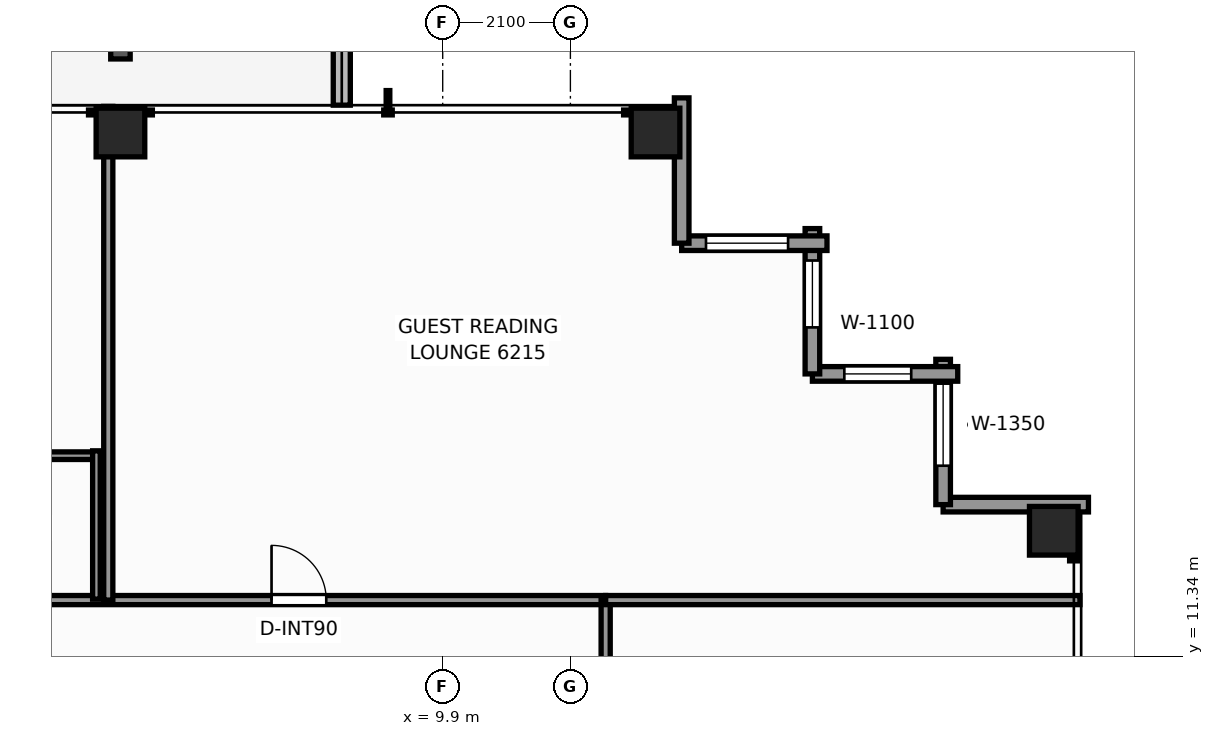
"""IFC4 building model, lengths in metres.
Left out: names, types, materials, properties, quantities, classifications, styles, units other than length and angle.
Written with IfcOpenShell. Run it as: python <this file> out.ifc"""

import sys

from ifc_helpers import new_model, si_unit, direction, frame, frame_2d, origin, origin_2d, place, context, subcontext, project, spatial, rectangle, extrude, element, fill, save


model = new_model("IFC4")
c1 = context("Model", 3, precision=1e-05, world=origin(), true_north=direction((0.0, 1.0)))
c2 = subcontext(c1, "Body", "Model", "MODEL_VIEW")
j1 = project(units=[si_unit("LENGTHUNIT", "METRE"), si_unit("PLANEANGLEUNIT", "RADIAN")], contexts=[c1])
p1 = place(None, origin())
s1 = spatial("IfcSite", under=j1, at=p1, CompositionType="ELEMENT")
p2 = place(p1, origin())
s2 = spatial("IfcBuilding", under=s1, at=p2, CompositionType="ELEMENT")
p3 = place(p2, frame((0.0, 0.0, 213.0)))
s3 = spatial("IfcBuildingStorey", under=s2, at=p3, CompositionType="ELEMENT", Elevation=213.0)
for number, where, z_axis, x_axis in (
    (1, (4.6, 19.95, 0.0), (0.0, 0.0, 1.0), (1.0, 0.0, 0.0)),
    (2, (13.4, 19.95, 0.0), (0.0, 0.0, 1.0), (1.0, 0.0, 0.0)),
    (3, (19.95, 13.4, 0.0), (0.0, 0.0, 1.0), (1.0, 0.0, 0.0)),
):
    element("IfcColumn", number, at=place(p3, frame(where, z_axis=z_axis, x_axis=x_axis)), inside=s3, PredefinedType="COLUMN", context=c2, shape_type="SweptSolid", body=[
        extrude(rectangle(XDim=0.8, YDim=0.8, at=origin_2d()), origin(), (0.0, 0.0, 1.0), 3.3),
    ])
p4 = place(p3, frame((8.24, 20.4, -0.04), z_axis=(0.0, 0.0, 1.0), x_axis=(0.0, 1.0, 0.0)))
e4 = element("IfcWall", 4, at=p4, inside=s3, PredefinedType="PARAPET", context=c2, shape_type="SweptSolid", body=[
    extrude(rectangle(XDim=3.42, YDim=0.28, at=frame_2d((1.71, 0.0))), origin(), (0.0, 0.0, 1.0), 0.42),
])
p5 = place(p3, frame((18.13, 13.83, 0.0), z_axis=(0.0, 0.0, 1.0), x_axis=(1.0, 0.0, 0.0)))
e5 = element("IfcWall", 5, at=p5, inside=s3, PredefinedType="STANDARD", context=c2, shape_type="SweptSolid", body=[
    extrude(rectangle(XDim=2.39, YDim=0.24, at=frame_2d((1.195, 0.0))), origin(), (0.0, 0.0, 1.0), 2.463),
])
p6 = place(p3, frame((18.13, 16.22, 0.0), z_axis=(0.0, 0.0, 1.0), x_axis=(0.0, -1.0, 0.0)))
e6 = element("IfcWall", 6, at=p6, inside=s3, PredefinedType="STANDARD", context=c2, shape_type="SweptSolid", body=[
    extrude(rectangle(XDim=2.39, YDim=0.24, at=frame_2d((1.195, 0.0))), origin(), (0.0, 0.0, 1.0), 2.463),
])
p7 = place(p6, frame((0.4, 0.0, 0.65)))
e7 = element("IfcOpeningElement", 7, at=p7, cuts=e6, PredefinedType="OPENING", context=c2, shape_type="SweptSolid", body=[
    extrude(rectangle(XDim=1.35, YDim=1.55, at=frame_2d((0.675, 0.775))), frame((0.0, 0.13, 0.0), z_axis=(0.0, -1.0, 0.0), x_axis=(1.0, 0.0, 0.0)), (0.0, 0.0, 1.0), 0.26),
])
p8 = place(p3, frame((15.98, 15.98, 0.0), z_axis=(0.0, 0.0, 1.0), x_axis=(1.0, 0.0, 0.0)))
e8 = element("IfcWall", 8, at=p8, inside=s3, PredefinedType="STANDARD", context=c2, shape_type="SweptSolid", body=[
    extrude(rectangle(XDim=2.39, YDim=0.24, at=frame_2d((1.195, 0.0))), origin(), (0.0, 0.0, 1.0), 2.463),
])
p9 = place(p8, frame((0.525, 0.0, 0.65)))
e9 = element("IfcOpeningElement", 9, at=p9, cuts=e8, PredefinedType="OPENING", context=c2, shape_type="SweptSolid", body=[
    extrude(rectangle(XDim=1.1, YDim=1.45, at=frame_2d((0.55, 0.725))), frame((0.0, 0.13, 0.0), z_axis=(0.0, -1.0, 0.0), x_axis=(1.0, 0.0, 0.0)), (0.0, 0.0, 1.0), 0.26),
])
p10 = place(p3, frame((15.98, 18.37, 0.0), z_axis=(0.0, 0.0, 1.0), x_axis=(0.0, -1.0, 0.0)))
e10 = element("IfcWall", 10, at=p10, inside=s3, PredefinedType="STANDARD", context=c2, shape_type="SweptSolid", body=[
    extrude(rectangle(XDim=2.39, YDim=0.24, at=frame_2d((1.195, 0.0))), origin(), (0.0, 0.0, 1.0), 2.463),
])
p11 = place(p10, frame((0.525, 0.0, 0.65)))
e11 = element("IfcOpeningElement", 11, at=p11, cuts=e10, PredefinedType="OPENING", context=c2, shape_type="SweptSolid", body=[
    extrude(rectangle(XDim=1.1, YDim=1.45, at=frame_2d((0.55, 0.725))), frame((0.0, 0.13, 0.0), z_axis=(0.0, -1.0, 0.0), x_axis=(1.0, 0.0, 0.0)), (0.0, 0.0, 1.0), 0.26),
])
p12 = place(p3, frame((13.83, 18.13, 0.0), z_axis=(0.0, 0.0, 1.0), x_axis=(1.0, 0.0, 0.0)))
e12 = element("IfcWall", 12, at=p12, inside=s3, PredefinedType="STANDARD", context=c2, shape_type="SweptSolid", body=[
    extrude(rectangle(XDim=2.39, YDim=0.24, at=frame_2d((1.195, 0.0))), origin(), (0.0, 0.0, 1.0), 2.463),
])
p13 = place(p12, frame((0.4, 0.0, 0.65)))
e13 = element("IfcOpeningElement", 13, at=p13, cuts=e12, PredefinedType="OPENING", context=c2, shape_type="SweptSolid", body=[
    extrude(rectangle(XDim=1.35, YDim=1.55, at=frame_2d((0.675, 0.775))), frame((0.0, 0.13, 0.0), z_axis=(0.0, -1.0, 0.0), x_axis=(1.0, 0.0, 0.0)), (0.0, 0.0, 1.0), 0.26),
])
p14 = place(p3, frame((13.83, 20.52, 0.0), z_axis=(0.0, 0.0, 1.0), x_axis=(0.0, -1.0, 0.0)))
e14 = element("IfcWall", 14, at=p14, inside=s3, PredefinedType="STANDARD", context=c2, shape_type="SweptSolid", body=[
    extrude(rectangle(XDim=2.39, YDim=0.24, at=frame_2d((1.195, 0.0))), origin(), (0.0, 0.0, 1.0), 2.463),
])
p15 = place(p3, frame((-12.58, 12.26, 0.0), z_axis=(0.0, 0.0, 1.0), x_axis=(1.0, 0.0, 0.0)))
e15 = element("IfcWall", 15, at=p15, inside=s3, PredefinedType="PARTITIONING", context=c2, shape_type="SweptSolid", body=[
    extrude(rectangle(XDim=25.16, YDim=0.15, at=frame_2d((12.58, 0.0))), origin(), (0.0, 0.0, 1.0), 2.369),
])
p16 = place(p15, frame((3.133, 0.0, 0.0)))
e16 = element("IfcOpeningElement", 16, at=p16, cuts=e15, PredefinedType="OPENING", context=c2, shape_type="SweptSolid", body=[
    extrude(rectangle(XDim=0.9, YDim=2.06, at=frame_2d((0.45, 1.03))), frame((0.0, 0.085, 0.0), z_axis=(0.0, -1.0, 0.0), x_axis=(1.0, 0.0, 0.0)), (0.0, 0.0, 1.0), 0.17),
])
p17 = place(p15, frame((9.188, 0.0, 0.0)))
e17 = element("IfcOpeningElement", 17, at=p17, cuts=e15, PredefinedType="OPENING", context=c2, shape_type="SweptSolid", body=[
    extrude(rectangle(XDim=0.95, YDim=2.06, at=frame_2d((0.475, 1.03))), frame((0.0, 0.085, 0.0), z_axis=(0.0, -1.0, 0.0), x_axis=(1.0, 0.0, 0.0)), (0.0, 0.0, 1.0), 0.17),
])
p18 = place(p15, frame((13.087, 0.0, 0.0)))
e18 = element("IfcOpeningElement", 18, at=p18, cuts=e15, PredefinedType="OPENING", context=c2, shape_type="SweptSolid", body=[
    extrude(rectangle(XDim=0.95, YDim=2.06, at=frame_2d((0.475, 1.03))), frame((0.0, 0.085, 0.0), z_axis=(0.0, -1.0, 0.0), x_axis=(1.0, 0.0, 0.0)), (0.0, 0.0, 1.0), 0.17),
])
p19 = place(p15, frame((19.665, 0.0, 0.0)))
e19 = element("IfcOpeningElement", 19, at=p19, cuts=e15, PredefinedType="OPENING", context=c2, shape_type="SweptSolid", body=[
    extrude(rectangle(XDim=0.9, YDim=2.06, at=frame_2d((0.45, 1.03))), frame((0.0, 0.085, 0.0), z_axis=(0.0, -1.0, 0.0), x_axis=(1.0, 0.0, 0.0)), (0.0, 0.0, 1.0), 0.17),
])
p20 = place(p3, frame((12.58, -12.58, 0.0), z_axis=(0.0, 0.0, 1.0), x_axis=(0.0, 1.0, 0.0)))
e20 = element("IfcWall", 20, at=p20, inside=s3, PredefinedType="PARTITIONING", context=c2, shape_type="SweptSolid", body=[
    extrude(rectangle(XDim=24.84, YDim=0.15, at=frame_2d((12.42, 0.0))), origin(), (0.0, 0.0, 1.0), 2.369),
])
p21 = place(p20, frame((3.338, 0.0, 0.0)))
e21 = element("IfcOpeningElement", 21, at=p21, cuts=e20, PredefinedType="OPENING", context=c2, shape_type="SweptSolid", body=[
    extrude(rectangle(XDim=0.95, YDim=2.06, at=frame_2d((0.475, 1.03))), frame((0.0, 0.085, 0.0), z_axis=(0.0, -1.0, 0.0), x_axis=(1.0, 0.0, 0.0)), (0.0, 0.0, 1.0), 0.17),
])
p22 = place(p20, frame((9.119, 0.0, 0.0)))
e22 = element("IfcOpeningElement", 22, at=p22, cuts=e20, PredefinedType="OPENING", context=c2, shape_type="SweptSolid", body=[
    extrude(rectangle(XDim=0.95, YDim=2.06, at=frame_2d((0.475, 1.03))), frame((0.0, 0.085, 0.0), z_axis=(0.0, -1.0, 0.0), x_axis=(1.0, 0.0, 0.0)), (0.0, 0.0, 1.0), 0.17),
])
p23 = place(p20, frame((14.452, 0.0, 0.0)))
e23 = element("IfcOpeningElement", 23, at=p23, cuts=e20, PredefinedType="OPENING", context=c2, shape_type="SweptSolid", body=[
    extrude(rectangle(XDim=0.95, YDim=2.06, at=frame_2d((0.475, 1.03))), frame((0.0, 0.085, 0.0), z_axis=(0.0, -1.0, 0.0), x_axis=(1.0, 0.0, 0.0)), (0.0, 0.0, 1.0), 0.17),
])
p24 = place(p20, frame((20.887, 0.0, 0.0)))
e24 = element("IfcOpeningElement", 24, at=p24, cuts=e20, PredefinedType="OPENING", context=c2, shape_type="SweptSolid", body=[
    extrude(rectangle(XDim=0.95, YDim=2.06, at=frame_2d((0.475, 1.03))), frame((0.0, 0.085, 0.0), z_axis=(0.0, -1.0, 0.0), x_axis=(1.0, 0.0, 0.0)), (0.0, 0.0, 1.0), 0.17),
])
p25 = place(p3, frame((12.58, 12.26, 0.0), z_axis=(0.0, 0.0, 1.0), x_axis=(1.0, 0.0, 0.0)))
e25 = element("IfcWall", 25, at=p25, inside=s3, PredefinedType="PARTITIONING", context=c2, shape_type="SweptSolid", body=[
    extrude(rectangle(XDim=7.8, YDim=0.15, at=frame_2d((3.9, 0.0))), origin(), (0.0, 0.0, 1.0), 2.369),
])
p26 = place(p3, frame((4.4, 12.26, 0.0), z_axis=(0.0, 0.0, 1.0), x_axis=(0.0, 1.0, 0.0)))
e26 = element("IfcWall", 26, at=p26, inside=s3, PredefinedType="PARTITIONING", context=c2, shape_type="SweptSolid", body=[
    extrude(rectangle(XDim=8.12, YDim=0.15, at=frame_2d((4.06, 0.0))), origin(), (0.0, 0.0, 1.0), 2.369),
])
p27 = place(p3, frame((1.995, 14.635, 0.0), z_axis=(0.0, 0.0, 1.0), x_axis=(1.0, 0.0, 0.0)))
e27 = element("IfcWall", 27, at=p27, inside=s3, PredefinedType="PARTITIONING", context=c2, shape_type="SweptSolid", body=[
    extrude(rectangle(XDim=2.27, YDim=0.125, at=frame_2d((1.135, 0.0))), origin(), (0.0, 0.0, 1.0), 3.08),
])
p28 = place(p3, frame((4.205, 12.275, 0.0), z_axis=(0.0, 0.0, 1.0), x_axis=(0.0, 1.0, 0.0)))
e28 = element("IfcWall", 28, at=p28, inside=s3, PredefinedType="PARTITIONING", context=c2, shape_type="SweptSolid", body=[
    extrude(rectangle(XDim=2.44, YDim=0.125, at=frame_2d((1.22, 0.0))), origin(), (0.0, 0.0, 1.0), 3.08),
])
p29 = place(p7, origin())
e29 = element("IfcWindow", 29, at=p29, inside=s3, PartitioningType="SINGLE_PANEL", PredefinedType="WINDOW", context=c2, shape_type="SweptSolid", body=[
    extrude(rectangle(XDim=1.35, YDim=1.55, at=frame_2d((0.675, 0.775))), frame((0.0, 0.03, 0.0), z_axis=(0.0, -1.0, 0.0), x_axis=(1.0, 0.0, 0.0)), (0.0, 0.0, 1.0), 0.06),
])
fill(e7, e29)
p30 = place(p9, origin())
e30 = element("IfcWindow", 30, at=p30, inside=s3, PartitioningType="SINGLE_PANEL", PredefinedType="WINDOW", context=c2, shape_type="SweptSolid", body=[
    extrude(rectangle(XDim=1.1, YDim=1.45, at=frame_2d((0.55, 0.725))), frame((0.0, 0.03, 0.0), z_axis=(0.0, -1.0, 0.0), x_axis=(1.0, 0.0, 0.0)), (0.0, 0.0, 1.0), 0.06),
])
fill(e9, e30)
p31 = place(p11, origin())
e31 = element("IfcWindow", 31, at=p31, inside=s3, PartitioningType="SINGLE_PANEL", PredefinedType="WINDOW", context=c2, shape_type="SweptSolid", body=[
    extrude(rectangle(XDim=1.1, YDim=1.45, at=frame_2d((0.55, 0.725))), frame((0.0, 0.03, 0.0), z_axis=(0.0, -1.0, 0.0), x_axis=(1.0, 0.0, 0.0)), (0.0, 0.0, 1.0), 0.06),
])
fill(e11, e31)
p32 = place(p13, origin())
e32 = element("IfcWindow", 32, at=p32, inside=s3, PartitioningType="SINGLE_PANEL", PredefinedType="WINDOW", context=c2, shape_type="SweptSolid", body=[
    extrude(rectangle(XDim=1.35, YDim=1.55, at=frame_2d((0.675, 0.775))), frame((0.0, 0.03, 0.0), z_axis=(0.0, -1.0, 0.0), x_axis=(1.0, 0.0, 0.0)), (0.0, 0.0, 1.0), 0.06),
])
fill(e13, e32)
p33 = place(p19, origin())
e33 = element("IfcDoor", 33, at=p33, inside=s3, OperationType="SINGLE_SWING_LEFT", PredefinedType="DOOR", context=c2, shape_type="SweptSolid", body=[
    extrude(rectangle(XDim=0.9, YDim=2.06, at=frame_2d((0.45, 1.03))), frame((0.0, 0.025, 0.0), z_axis=(0.0, -1.0, 0.0), x_axis=(1.0, 0.0, 0.0)), (0.0, 0.0, 1.0), 0.05),
])
fill(e19, e33)
save(model, sys.argv[1])
